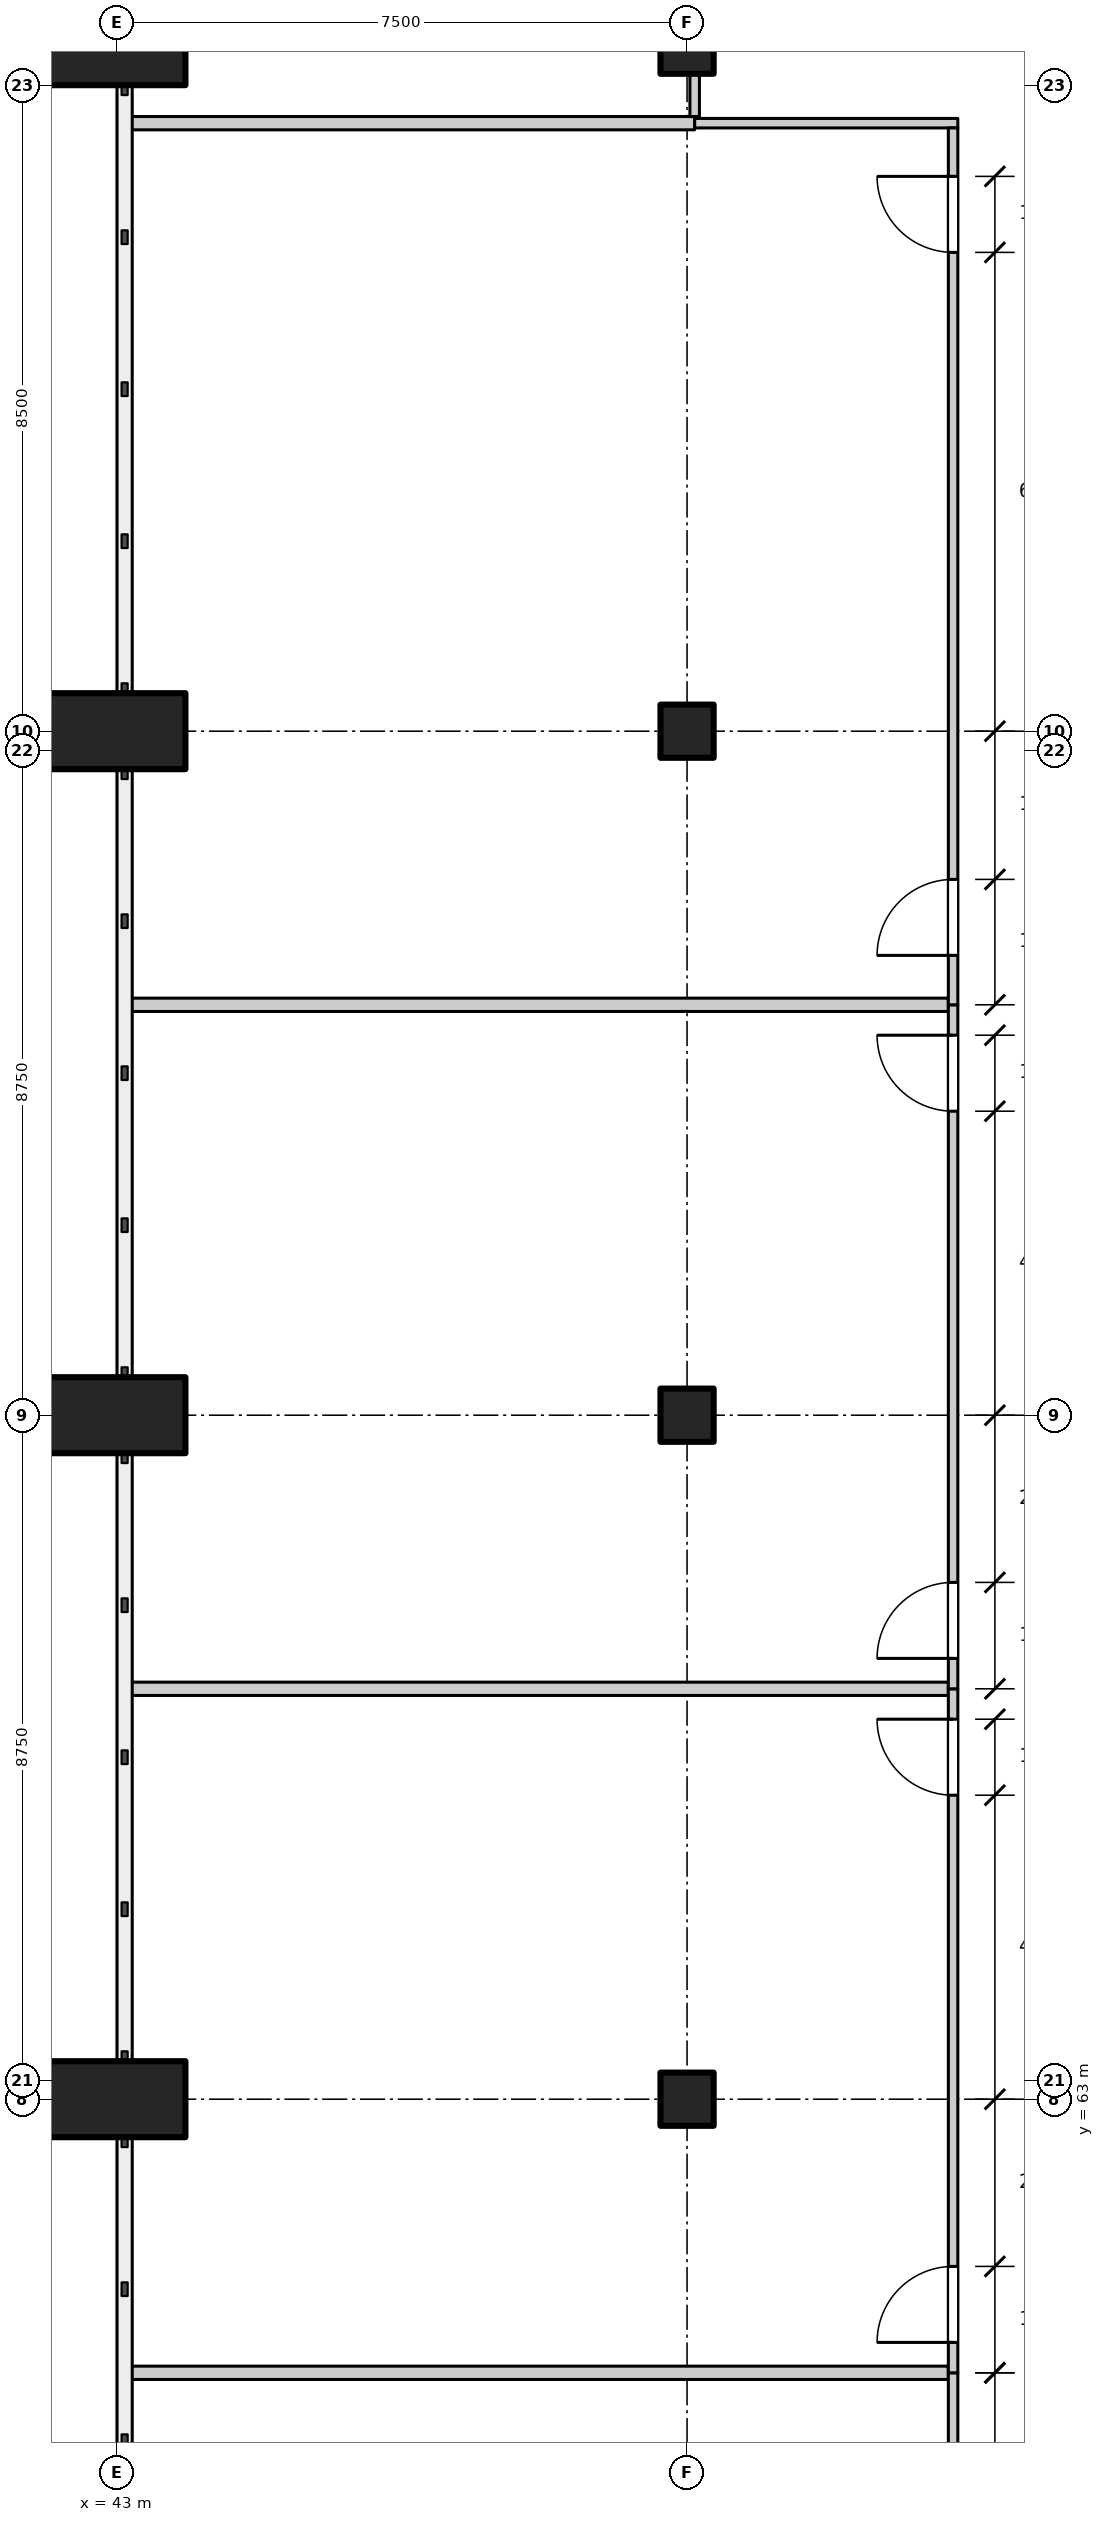
"""IFC4 building model, lengths in metres.
Left out: names, types, materials, properties, quantities, classifications, styles, units other than length and angle.
Written with IfcOpenShell. Run it as: python <this file> out.ifc"""

import sys

from ifc_helpers import new_model, si_unit, direction, frame, frame_2d, origin, origin_2d, place, context, subcontext, project, spatial, rectangle, extrude, element, fill, save


model = new_model("IFC4")
c1 = context("Model", 3, precision=1e-05, world=origin(), true_north=direction((0.0, 1.0)))
c2 = subcontext(c1, "Body", "Model", "MODEL_VIEW")
j1 = project(units=[si_unit("LENGTHUNIT", "METRE"), si_unit("PLANEANGLEUNIT", "RADIAN")], contexts=[c1])
p1 = place(None, origin())
s1 = spatial("IfcSite", under=j1, at=p1, CompositionType="ELEMENT")
p2 = place(p1, origin())
s2 = spatial("IfcBuilding", under=s1, at=p2, CompositionType="ELEMENT")
p3 = place(p2, frame((0.0, 0.0, 6.0)))
s3 = spatial("IfcBuildingStorey", under=s2, at=p3, CompositionType="ELEMENT", Elevation=6.0)
for number, where, z_axis, x_axis in (
    (1, (50.5, 63.0, 0.0), (0.0, 0.0, 1.0), (1.0, 0.0, 0.0)),
    (2, (50.5, 72.0, 0.0), (0.0, 0.0, 1.0), (1.0, 0.0, 0.0)),
    (3, (50.5, 81.0, 0.0), (0.0, 0.0, 1.0), (1.0, 0.0, 0.0)),
    (4, (50.5, 90.0, 0.0), (0.0, 0.0, 1.0), (1.0, 0.0, 0.0)),
):
    element("IfcColumn", number, at=place(p3, frame(where, z_axis=z_axis, x_axis=x_axis)), inside=s3, PredefinedType="COLUMN", context=c2, shape_type="SweptSolid", body=[
        extrude(rectangle(XDim=0.7, YDim=0.7, at=origin_2d()), origin(), (0.0, 0.0, 1.0), 4.2),
    ])
for number, where, z_axis, x_axis in (
    (5, (43.0, 63.0, 0.0), (0.0, 0.0, 1.0), (1.0, 0.0, 0.0)),
    (6, (43.0, 72.0, 0.0), (0.0, 0.0, 1.0), (1.0, 0.0, 0.0)),
    (7, (43.0, 81.0, 0.0), (0.0, 0.0, 1.0), (1.0, 0.0, 0.0)),
    (8, (43.0, 90.0, 0.0), (0.0, 0.0, 1.0), (1.0, 0.0, 0.0)),
):
    element("IfcColumn", number, at=place(p3, frame(where, z_axis=z_axis, x_axis=x_axis)), inside=s3, PredefinedType="COLUMN", context=c2, shape_type="SweptSolid", body=[
        extrude(rectangle(XDim=1.8, YDim=1.0, at=origin_2d()), origin(), (0.0, 0.0, 1.0), 4.2),
    ])
for number, where, z_axis, x_axis in (
    (9, (43.15, 59.4, 0.0), (0.0, 0.0, 1.0), (1.0, 0.0, 0.0)),
    (10, (43.15, 68.4, 0.0), (0.0, 0.0, 1.0), (1.0, 0.0, 0.0)),
    (11, (43.15, 77.4, 0.0), (0.0, 0.0, 1.0), (1.0, 0.0, 0.0)),
):
    element("IfcWall", number, at=place(p3, frame(where, z_axis=z_axis, x_axis=x_axis)), inside=s3, PredefinedType="PARTITIONING", context=c2, shape_type="SweptSolid", body=[
        extrude(rectangle(XDim=10.788, YDim=0.175, at=frame_2d((5.394, 0.0))), origin(), (0.0, 0.0, 1.0), 4.0),
    ])
p4 = place(p3, frame((43.15, 89.0, 0.0), z_axis=(0.0, 0.0, 1.0), x_axis=(1.0, 0.0, 0.0)))
e12 = element("IfcWall", 12, at=p4, inside=s3, PredefinedType="PARTITIONING", context=c2, shape_type="SweptSolid", body=[
    extrude(rectangle(XDim=7.45, YDim=0.175, at=frame_2d((3.725, 0.0))), origin(), (0.0, 0.0, 1.0), 4.0),
])
p5 = place(p3, frame((50.6, 89.0, 0.0), z_axis=(0.0, 0.0, 1.0), x_axis=(1.0, 0.0, 0.0)))
e13 = element("IfcWall", 13, at=p5, inside=s3, PredefinedType="PARTITIONING", context=c2, shape_type="SweptSolid", body=[
    extrude(rectangle(XDim=3.462, YDim=0.125, at=frame_2d((1.731, 0.0))), origin(), (0.0, 0.0, 1.0), 4.0),
])
p6 = place(p3, frame((50.6, 89.087, 0.0), z_axis=(0.0, 0.0, 1.0), x_axis=(0.0, 1.0, 0.0)))
e14 = element("IfcWall", 14, at=p6, inside=s3, PredefinedType="PARTITIONING", context=c2, shape_type="SweptSolid", body=[
    extrude(rectangle(XDim=0.562, YDim=0.125, at=frame_2d((0.281, 0.0))), origin(), (0.0, 0.0, 1.0), 3.3),
])
p7 = place(p3, frame((54.0, 38.4, 0.0), z_axis=(0.0, 0.0, 1.0), x_axis=(0.0, 1.0, 0.0)))
e15 = element("IfcWall", 15, at=p7, inside=s3, PredefinedType="PARTITIONING", context=c2, shape_type="SweptSolid", body=[
    extrude(rectangle(XDim=21.0, YDim=0.125, at=frame_2d((10.5, 0.0))), origin(), (0.0, 0.0, 1.0), 3.25),
])
p8 = place(p7, frame((2.25, 0.0, 0.0)))
e16 = element("IfcOpeningElement", 16, at=p8, cuts=e15, PredefinedType="OPENING", context=c2, shape_type="SweptSolid", body=[
    extrude(rectangle(XDim=1.8, YDim=2.1, at=frame_2d((0.9, 1.05))), frame((0.0, 0.073, 0.0), z_axis=(0.0, -1.0, 0.0), x_axis=(1.0, 0.0, 0.0)), (0.0, 0.0, 1.0), 0.145),
])
p9 = place(p7, frame((16.95, 0.0, 0.0)))
e17 = element("IfcOpeningElement", 17, at=p9, cuts=e15, PredefinedType="OPENING", context=c2, shape_type="SweptSolid", body=[
    extrude(rectangle(XDim=1.8, YDim=2.1, at=frame_2d((0.9, 1.05))), frame((0.0, 0.073, 0.0), z_axis=(0.0, -1.0, 0.0), x_axis=(1.0, 0.0, 0.0)), (0.0, 0.0, 1.0), 0.145),
])
p10 = place(p3, frame((54.0, 59.4, 0.0), z_axis=(0.0, 0.0, 1.0), x_axis=(0.0, 1.0, 0.0)))
e18 = element("IfcWall", 18, at=p10, inside=s3, PredefinedType="PARTITIONING", context=c2, shape_type="SweptSolid", body=[
    extrude(rectangle(XDim=9.0, YDim=0.125, at=frame_2d((4.5, 0.0))), origin(), (0.0, 0.0, 1.0), 3.25),
])
p11 = place(p10, frame((0.4, 0.0, 0.0)))
e19 = element("IfcOpeningElement", 19, at=p11, cuts=e18, PredefinedType="OPENING", context=c2, shape_type="SweptSolid", body=[
    extrude(rectangle(XDim=1.0, YDim=2.1, at=frame_2d((0.5, 1.05))), frame((0.0, 0.073, 0.0), z_axis=(0.0, -1.0, 0.0), x_axis=(1.0, 0.0, 0.0)), (0.0, 0.0, 1.0), 0.145),
])
p12 = place(p10, frame((7.6, 0.0, 0.0)))
e20 = element("IfcOpeningElement", 20, at=p12, cuts=e18, PredefinedType="OPENING", context=c2, shape_type="SweptSolid", body=[
    extrude(rectangle(XDim=1.0, YDim=2.1, at=frame_2d((0.5, 1.05))), frame((0.0, 0.073, 0.0), z_axis=(0.0, -1.0, 0.0), x_axis=(1.0, 0.0, 0.0)), (0.0, 0.0, 1.0), 0.145),
])
p13 = place(p3, frame((54.0, 68.4, 0.0), z_axis=(0.0, 0.0, 1.0), x_axis=(0.0, 1.0, 0.0)))
e21 = element("IfcWall", 21, at=p13, inside=s3, PredefinedType="PARTITIONING", context=c2, shape_type="SweptSolid", body=[
    extrude(rectangle(XDim=9.0, YDim=0.125, at=frame_2d((4.5, 0.0))), origin(), (0.0, 0.0, 1.0), 3.25),
])
p14 = place(p13, frame((0.4, 0.0, 0.0)))
e22 = element("IfcOpeningElement", 22, at=p14, cuts=e21, PredefinedType="OPENING", context=c2, shape_type="SweptSolid", body=[
    extrude(rectangle(XDim=1.0, YDim=2.1, at=frame_2d((0.5, 1.05))), frame((0.0, 0.073, 0.0), z_axis=(0.0, -1.0, 0.0), x_axis=(1.0, 0.0, 0.0)), (0.0, 0.0, 1.0), 0.145),
])
p15 = place(p13, frame((7.6, 0.0, 0.0)))
e23 = element("IfcOpeningElement", 23, at=p15, cuts=e21, PredefinedType="OPENING", context=c2, shape_type="SweptSolid", body=[
    extrude(rectangle(XDim=1.0, YDim=2.1, at=frame_2d((0.5, 1.05))), frame((0.0, 0.073, 0.0), z_axis=(0.0, -1.0, 0.0), x_axis=(1.0, 0.0, 0.0)), (0.0, 0.0, 1.0), 0.145),
])
p16 = place(p3, frame((54.0, 77.4, 0.0), z_axis=(0.0, 0.0, 1.0), x_axis=(0.0, 1.0, 0.0)))
e24 = element("IfcWall", 24, at=p16, inside=s3, PredefinedType="PARTITIONING", context=c2, shape_type="SweptSolid", body=[
    extrude(rectangle(XDim=11.538, YDim=0.125, at=frame_2d((5.769, 0.0))), origin(), (0.0, 0.0, 1.0), 3.25),
])
p17 = place(p16, frame((0.65, 0.0, 0.0)))
e25 = element("IfcOpeningElement", 25, at=p17, cuts=e24, PredefinedType="OPENING", context=c2, shape_type="SweptSolid", body=[
    extrude(rectangle(XDim=1.0, YDim=2.1, at=frame_2d((0.5, 1.05))), frame((0.0, 0.073, 0.0), z_axis=(0.0, -1.0, 0.0), x_axis=(1.0, 0.0, 0.0)), (0.0, 0.0, 1.0), 0.145),
])
p18 = place(p16, frame((9.9, 0.0, 0.0)))
e26 = element("IfcOpeningElement", 26, at=p18, cuts=e24, PredefinedType="OPENING", context=c2, shape_type="SweptSolid", body=[
    extrude(rectangle(XDim=1.0, YDim=2.1, at=frame_2d((0.5, 1.05))), frame((0.0, 0.073, 0.0), z_axis=(0.0, -1.0, 0.0), x_axis=(1.0, 0.0, 0.0)), (0.0, 0.0, 1.0), 0.145),
])
p19 = place(p11, origin())
e27 = element("IfcDoor", 27, at=p19, inside=s3, OperationType="SINGLE_SWING_LEFT", PredefinedType="DOOR", context=c2, shape_type="SweptSolid", body=[
    extrude(rectangle(XDim=1.0, YDim=2.1, at=frame_2d((0.5, 1.05))), frame((0.0, 0.025, 0.0), z_axis=(0.0, -1.0, 0.0), x_axis=(1.0, 0.0, 0.0)), (0.0, 0.0, 1.0), 0.05),
])
fill(e19, e27)
p20 = place(p12, origin())
e28 = element("IfcDoor", 28, at=p20, inside=s3, OperationType="SINGLE_SWING_RIGHT", PredefinedType="DOOR", context=c2, shape_type="SweptSolid", body=[
    extrude(rectangle(XDim=1.0, YDim=2.1, at=frame_2d((0.5, 1.05))), frame((0.0, 0.025, 0.0), z_axis=(0.0, -1.0, 0.0), x_axis=(1.0, 0.0, 0.0)), (0.0, 0.0, 1.0), 0.05),
])
fill(e20, e28)
p21 = place(p14, origin())
e29 = element("IfcDoor", 29, at=p21, inside=s3, OperationType="SINGLE_SWING_LEFT", PredefinedType="DOOR", context=c2, shape_type="SweptSolid", body=[
    extrude(rectangle(XDim=1.0, YDim=2.1, at=frame_2d((0.5, 1.05))), frame((0.0, 0.025, 0.0), z_axis=(0.0, -1.0, 0.0), x_axis=(1.0, 0.0, 0.0)), (0.0, 0.0, 1.0), 0.05),
])
fill(e22, e29)
p22 = place(p15, origin())
e30 = element("IfcDoor", 30, at=p22, inside=s3, OperationType="SINGLE_SWING_RIGHT", PredefinedType="DOOR", context=c2, shape_type="SweptSolid", body=[
    extrude(rectangle(XDim=1.0, YDim=2.1, at=frame_2d((0.5, 1.05))), frame((0.0, 0.025, 0.0), z_axis=(0.0, -1.0, 0.0), x_axis=(1.0, 0.0, 0.0)), (0.0, 0.0, 1.0), 0.05),
])
fill(e23, e30)
p23 = place(p17, origin())
e31 = element("IfcDoor", 31, at=p23, inside=s3, OperationType="SINGLE_SWING_LEFT", PredefinedType="DOOR", context=c2, shape_type="SweptSolid", body=[
    extrude(rectangle(XDim=1.0, YDim=2.1, at=frame_2d((0.5, 1.05))), frame((0.0, 0.025, 0.0), z_axis=(0.0, -1.0, 0.0), x_axis=(1.0, 0.0, 0.0)), (0.0, 0.0, 1.0), 0.05),
])
fill(e25, e31)
p24 = place(p18, origin())
e32 = element("IfcDoor", 32, at=p24, inside=s3, OperationType="SINGLE_SWING_RIGHT", PredefinedType="DOOR", context=c2, shape_type="SweptSolid", body=[
    extrude(rectangle(XDim=1.0, YDim=2.1, at=frame_2d((0.5, 1.05))), frame((0.0, 0.025, 0.0), z_axis=(0.0, -1.0, 0.0), x_axis=(1.0, 0.0, 0.0)), (0.0, 0.0, 1.0), 0.05),
])
fill(e26, e32)
save(model, sys.argv[1])
